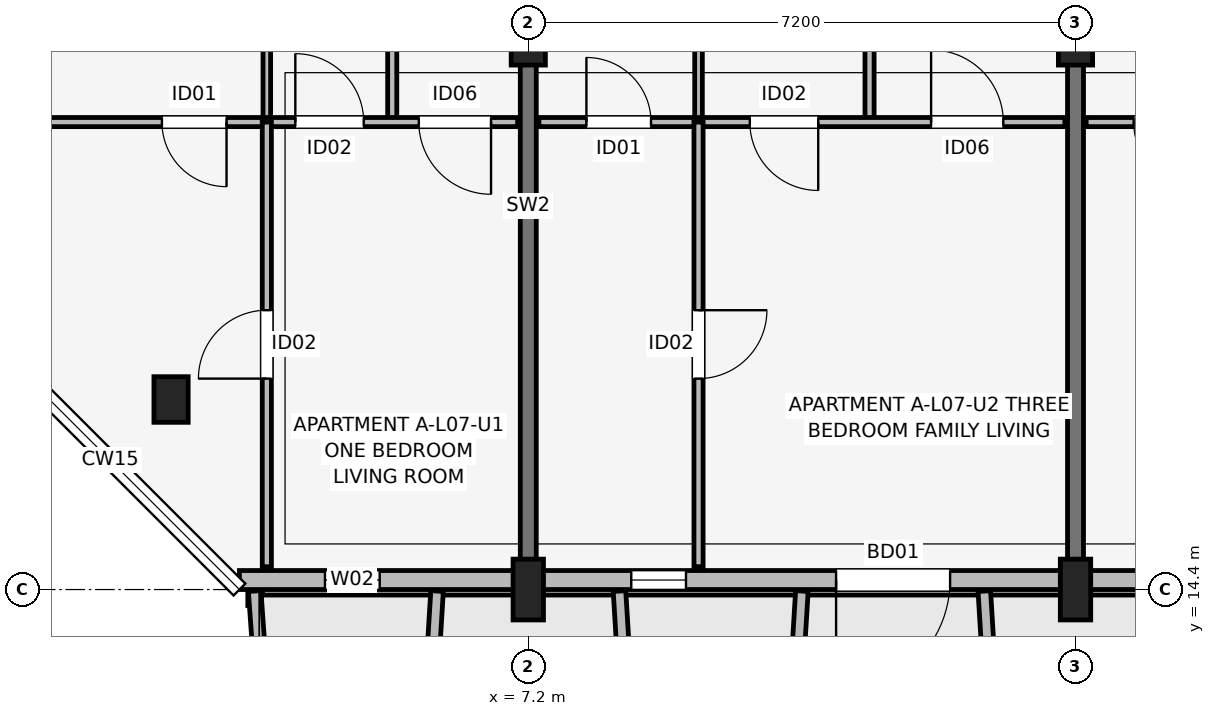
"""IFC4 building model, lengths in metres.
Left out: names, types, materials, properties, quantities, classifications, styles, units other than length and angle.
Written with IfcOpenShell. Run it as: python <this file> out.ifc"""

import sys

from ifc_helpers import new_model, si_unit, direction, frame, frame_2d, origin, origin_2d, place, context, subcontext, project, spatial, rectangle, extrude, element, fill, save


model = new_model("IFC4")
c1 = context("Model", 3, precision=1e-05, world=origin(), true_north=direction((0.0, 1.0)))
c2 = subcontext(c1, "Body", "Model", "MODEL_VIEW")
j1 = project(units=[si_unit("LENGTHUNIT", "METRE"), si_unit("PLANEANGLEUNIT", "RADIAN")], contexts=[c1])
p1 = place(None, origin())
s1 = spatial("IfcSite", under=j1, at=p1, CompositionType="ELEMENT")
p2 = place(p1, origin())
s2 = spatial("IfcBuilding", under=s1, at=p2, CompositionType="ELEMENT")
p3 = place(p2, frame((0.0, 0.0, 24.45)))
s3 = spatial("IfcBuildingStorey", under=s2, at=p3, CompositionType="ELEMENT", Elevation=24.45)
p4 = place(p3, frame((2.5, 16.9, 0.0), z_axis=(0.0, 0.0, 1.0), x_axis=(1.0, 0.0, 0.0)))
e1 = element("IfcColumn", 1, at=p4, inside=s3, PredefinedType="COLUMN", context=c2, shape_type="SweptSolid", body=[
    extrude(rectangle(XDim=0.45, YDim=0.6, at=origin_2d()), origin(), (0.0, 0.0, 1.0), 3.15),
])
p5 = place(p3, frame((7.2, 14.4, 0.0), z_axis=(0.0, 0.0, 1.0), x_axis=(1.0, 0.0, 0.0)))
e2 = element("IfcColumn", 2, at=p5, inside=s3, PredefinedType="COLUMN", context=c2, shape_type="SweptSolid", body=[
    extrude(rectangle(XDim=0.4, YDim=0.8, at=origin_2d()), origin(), (0.0, 0.0, 1.0), 3.15),
])
p6 = place(p3, frame((7.2, 21.6, 0.0), z_axis=(0.0, 0.0, 1.0), x_axis=(1.0, 0.0, 0.0)))
e3 = element("IfcColumn", 3, at=p6, inside=s3, PredefinedType="COLUMN", context=c2, shape_type="SweptSolid", body=[
    extrude(rectangle(XDim=0.45, YDim=0.6, at=origin_2d()), origin(), (0.0, 0.0, 1.0), 3.15),
])
p7 = place(p3, frame((14.4, 14.4, 0.0), z_axis=(0.0, 0.0, 1.0), x_axis=(1.0, 0.0, 0.0)))
e4 = element("IfcColumn", 4, at=p7, inside=s3, PredefinedType="COLUMN", context=c2, shape_type="SweptSolid", body=[
    extrude(rectangle(XDim=0.4, YDim=0.8, at=origin_2d()), origin(), (0.0, 0.0, 1.0), 3.15),
])
p8 = place(p3, frame((14.4, 21.6, 0.0), z_axis=(0.0, 0.0, 1.0), x_axis=(1.0, 0.0, 0.0)))
e5 = element("IfcColumn", 5, at=p8, inside=s3, PredefinedType="COLUMN", context=c2, shape_type="SweptSolid", body=[
    extrude(rectangle(XDim=0.45, YDim=0.6, at=origin_2d()), origin(), (0.0, 0.0, 1.0), 3.15),
])
for number, where, z_axis, x_axis in (
    (6, (7.2, 14.75, 0.0), (0.0, 0.0, 1.0), (0.0, 1.0, 0.0)),
    (7, (14.4, 14.75, 0.0), (0.0, 0.0, 1.0), (0.0, 1.0, 0.0)),
):
    element("IfcWall", number, at=place(p3, frame(where, z_axis=z_axis, x_axis=x_axis)), inside=s3, PredefinedType="SHEAR", context=c2, shape_type="SweptSolid", body=[
        extrude(rectangle(XDim=9.4, YDim=0.21, at=frame_2d((4.7, 0.0))), origin(), (0.0, 0.0, 1.0), 3.15),
    ])
p9 = place(p3, frame((3.4, 14.525, 0.0), z_axis=(0.0, 0.0, 1.0), x_axis=(1.0, 0.0, 0.0)))
e8 = element("IfcWall", 8, at=p9, inside=s3, PredefinedType="SOLIDWALL", context=c2, shape_type="SweptSolid", body=[
    extrude(rectangle(XDim=29.2, YDim=0.25, at=frame_2d((14.6, 0.0))), origin(), (0.0, 0.0, 1.0), 2.43),
])
p10 = place(p9, frame((9.35, 0.0, 0.0), z_axis=(0.0, 0.0, 1.0), x_axis=(-1.0, 0.0, 0.0)))
e9 = element("IfcOpeningElement", 9, at=p10, cuts=e8, PredefinedType="OPENING", context=c2, shape_type="SweptSolid", body=[
    extrude(rectangle(XDim=1.5, YDim=2.15, at=frame_2d((0.75, 1.075))), frame((0.0, 0.135, 0.0), z_axis=(0.0, -1.0, 0.0), x_axis=(1.0, 0.0, 0.0)), (0.0, 0.0, 1.0), 0.27),
])
p11 = place(p9, frame((23.9, 0.0, 0.0), z_axis=(0.0, 0.0, 1.0), x_axis=(-1.0, 0.0, 0.0)))
e10 = element("IfcOpeningElement", 10, at=p11, cuts=e8, PredefinedType="OPENING", context=c2, shape_type="SweptSolid", body=[
    extrude(rectangle(XDim=1.8, YDim=2.15, at=frame_2d((0.9, 1.075))), frame((0.0, 0.135, 0.0), z_axis=(0.0, -1.0, 0.0), x_axis=(1.0, 0.0, 0.0)), (0.0, 0.0, 1.0), 0.27),
])
p12 = place(p9, frame((1.125, 0.0, 0.75)))
e11 = element("IfcOpeningElement", 11, at=p12, cuts=e8, PredefinedType="OPENING", context=c2, shape_type="SweptSolid", body=[
    extrude(rectangle(XDim=0.72, YDim=1.35, at=frame_2d((0.36, 0.675))), frame((0.0, 0.135, 0.0), z_axis=(0.0, -1.0, 0.0), x_axis=(1.0, 0.0, 0.0)), (0.0, 0.0, 1.0), 0.27),
])
p13 = place(p9, frame((5.155, 0.0, 0.75)))
e12 = element("IfcOpeningElement", 12, at=p13, cuts=e8, PredefinedType="OPENING", context=c2, shape_type="SweptSolid", body=[
    extrude(rectangle(XDim=0.72, YDim=1.35, at=frame_2d((0.36, 0.675))), frame((0.0, 0.135, 0.0), z_axis=(0.0, -1.0, 0.0), x_axis=(1.0, 0.0, 0.0)), (0.0, 0.0, 1.0), 0.27),
])
p14 = place(p9, frame((12.325, 0.0, 0.67)))
e13 = element("IfcOpeningElement", 13, at=p14, cuts=e8, PredefinedType="OPENING", context=c2, shape_type="SweptSolid", body=[
    extrude(rectangle(XDim=2.15, YDim=1.65, at=frame_2d((1.075, 0.825))), frame((0.0, 0.135, 0.0), z_axis=(0.0, -1.0, 0.0), x_axis=(1.0, 0.0, 0.0)), (0.0, 0.0, 1.0), 0.27),
])
p15 = place(p9, frame((19.555, 0.0, 0.75)))
e14 = element("IfcOpeningElement", 14, at=p15, cuts=e8, PredefinedType="OPENING", context=c2, shape_type="SweptSolid", body=[
    extrude(rectangle(XDim=0.72, YDim=1.35, at=frame_2d((0.36, 0.675))), frame((0.0, 0.135, 0.0), z_axis=(0.0, -1.0, 0.0), x_axis=(1.0, 0.0, 0.0)), (0.0, 0.0, 1.0), 0.27),
])
p16 = place(p3, frame((3.6, 14.38, 0.0), z_axis=(0.0, 0.0, 1.0), x_axis=(0.071194071069, -0.997462482625, 0.0)))
e15 = element("IfcWall", 15, at=p16, inside=s3, PredefinedType="ELEMENTEDWALL", context=c2, shape_type="SweptSolid", body=[
    extrude(rectangle(XDim=1.965, YDim=0.165, at=frame_2d((0.982, 0.0))), origin(), (0.0, 0.0, 1.0), 2.8),
])
p17 = place(p3, frame((6.0, 14.38, 0.0), z_axis=(0.0, 0.0, 1.0), x_axis=(-0.061170732449, -0.998127317276, 0.0)))
e16 = element("IfcWall", 16, at=p17, inside=s3, PredefinedType="ELEMENTEDWALL", context=c2, shape_type="SweptSolid", body=[
    extrude(rectangle(XDim=1.964, YDim=0.165, at=frame_2d((0.982, 0.0))), origin(), (0.0, 0.0, 1.0), 2.8),
])
for number, where, z_axis, x_axis in (
    (17, (8.4, 14.38, 0.0), (0.0, 0.0, 1.0), (0.061, -0.998, 0.0)),
    (18, (10.8, 14.38, 0.0), (0.0, 0.0, 1.0), (-0.061, -0.998, 0.0)),
    (19, (13.2, 14.38, 0.0), (0.0, 0.0, 1.0), (0.061, -0.998, 0.0)),
):
    element("IfcWall", number, at=place(p3, frame(where, z_axis=z_axis, x_axis=x_axis)), inside=s3, PredefinedType="ELEMENTEDWALL", context=c2, shape_type="SweptSolid", body=[
        extrude(rectangle(XDim=1.964, YDim=0.165, at=frame_2d((0.982, 0.0))), origin(), (0.0, 0.0, 1.0), 2.53),
    ])
p18 = place(p3, frame((3.76, 20.55, 0.0), z_axis=(0.0, 0.0, 1.0), x_axis=(0.0, 1.0, 0.0)))
e20 = element("IfcWall", 20, at=p18, inside=s3, PredefinedType="PARTITIONING", context=c2, shape_type="SweptSolid", body=[
    extrude(rectangle(XDim=3.75, YDim=0.1, at=frame_2d((1.875, 0.0))), origin(), (0.0, 0.0, 1.0), 2.38),
])
p19 = place(p3, frame((5.41, 20.55, 0.0), z_axis=(0.0, 0.0, 1.0), x_axis=(0.0, 1.0, 0.0)))
e21 = element("IfcWall", 21, at=p19, inside=s3, PredefinedType="PARTITIONING", context=c2, shape_type="SweptSolid", body=[
    extrude(rectangle(XDim=3.75, YDim=0.12, at=frame_2d((1.875, 0.0))), origin(), (0.0, 0.0, 1.0), 2.38),
])
p20 = place(p3, frame((0.14, 20.55, 0.0), z_axis=(0.0, 0.0, 1.0), x_axis=(1.0, 0.0, 0.0)))
e22 = element("IfcWall", 22, at=p20, inside=s3, PredefinedType="PARTITIONING", context=c2, shape_type="SweptSolid", body=[
    extrude(rectangle(XDim=6.92, YDim=0.12, at=frame_2d((3.46, 0.0))), origin(), (0.0, 0.0, 1.0), 2.38),
])
p21 = place(p20, frame((3.09, 0.0, 0.0), z_axis=(0.0, 0.0, 1.0), x_axis=(-1.0, 0.0, 0.0)))
e23 = element("IfcOpeningElement", 23, at=p21, cuts=e22, PredefinedType="OPENING", context=c2, shape_type="SweptSolid", body=[
    extrude(rectangle(XDim=0.85, YDim=2.08, at=frame_2d((0.425, 1.04))), frame((0.0, 0.07, 0.0), z_axis=(0.0, -1.0, 0.0), x_axis=(1.0, 0.0, 0.0)), (0.0, 0.0, 1.0), 0.14),
])
p22 = place(p20, frame((3.995, 0.0, 0.0)))
e24 = element("IfcOpeningElement", 24, at=p22, cuts=e22, PredefinedType="OPENING", context=c2, shape_type="SweptSolid", body=[
    extrude(rectangle(XDim=0.9, YDim=2.08, at=frame_2d((0.45, 1.04))), frame((0.0, 0.07, 0.0), z_axis=(0.0, -1.0, 0.0), x_axis=(1.0, 0.0, 0.0)), (0.0, 0.0, 1.0), 0.14),
])
p23 = place(p20, frame((6.57, 0.0, 0.0), z_axis=(0.0, 0.0, 1.0), x_axis=(-1.0, 0.0, 0.0)))
e25 = element("IfcOpeningElement", 25, at=p23, cuts=e22, PredefinedType="OPENING", context=c2, shape_type="SweptSolid", body=[
    extrude(rectangle(XDim=0.95, YDim=2.08, at=frame_2d((0.475, 1.04))), frame((0.0, 0.07, 0.0), z_axis=(0.0, -1.0, 0.0), x_axis=(1.0, 0.0, 0.0)), (0.0, 0.0, 1.0), 0.14),
])
p24 = place(p3, frame((3.76, 14.7, 0.0), z_axis=(0.0, 0.0, 1.0), x_axis=(0.0, 1.0, 0.0)))
e26 = element("IfcWall", 26, at=p24, inside=s3, PredefinedType="PARTITIONING", context=c2, shape_type="SweptSolid", body=[
    extrude(rectangle(XDim=5.85, YDim=0.12, at=frame_2d((2.925, 0.0))), origin(), (0.0, 0.0, 1.0), 2.38),
])
p25 = place(p24, frame((2.475, 0.0, 0.0)))
e27 = element("IfcOpeningElement", 27, at=p25, cuts=e26, PredefinedType="OPENING", context=c2, shape_type="SweptSolid", body=[
    extrude(rectangle(XDim=0.9, YDim=2.08, at=frame_2d((0.45, 1.04))), frame((0.0, 0.07, 0.0), z_axis=(0.0, -1.0, 0.0), x_axis=(1.0, 0.0, 0.0)), (0.0, 0.0, 1.0), 0.14),
])
p26 = place(p3, frame((9.44, 20.55, 0.0), z_axis=(0.0, 0.0, 1.0), x_axis=(0.0, 1.0, 0.0)))
e28 = element("IfcWall", 28, at=p26, inside=s3, PredefinedType="PARTITIONING", context=c2, shape_type="SweptSolid", body=[
    extrude(rectangle(XDim=3.75, YDim=0.1, at=frame_2d((1.875, 0.0))), origin(), (0.0, 0.0, 1.0), 2.38),
])
p27 = place(p3, frame((11.69, 20.55, 0.0), z_axis=(0.0, 0.0, 1.0), x_axis=(0.0, 1.0, 0.0)))
e29 = element("IfcWall", 29, at=p27, inside=s3, PredefinedType="PARTITIONING", context=c2, shape_type="SweptSolid", body=[
    extrude(rectangle(XDim=3.75, YDim=0.12, at=frame_2d((1.875, 0.0))), origin(), (0.0, 0.0, 1.0), 2.38),
])
p28 = place(p3, frame((7.34, 20.55, 0.0), z_axis=(0.0, 0.0, 1.0), x_axis=(1.0, 0.0, 0.0)))
e30 = element("IfcWall", 30, at=p28, inside=s3, PredefinedType="PARTITIONING", context=c2, shape_type="SweptSolid", body=[
    extrude(rectangle(XDim=6.92, YDim=0.12, at=frame_2d((3.46, 0.0))), origin(), (0.0, 0.0, 1.0), 2.38),
])
p29 = place(p28, frame((0.625, 0.0, 0.0)))
e31 = element("IfcOpeningElement", 31, at=p29, cuts=e30, PredefinedType="OPENING", context=c2, shape_type="SweptSolid", body=[
    extrude(rectangle(XDim=0.85, YDim=2.08, at=frame_2d((0.425, 1.04))), frame((0.0, 0.07, 0.0), z_axis=(0.0, -1.0, 0.0), x_axis=(1.0, 0.0, 0.0)), (0.0, 0.0, 1.0), 0.14),
])
p30 = place(p28, frame((3.675, 0.0, 0.0), z_axis=(0.0, 0.0, 1.0), x_axis=(-1.0, 0.0, 0.0)))
e32 = element("IfcOpeningElement", 32, at=p30, cuts=e30, PredefinedType="OPENING", context=c2, shape_type="SweptSolid", body=[
    extrude(rectangle(XDim=0.9, YDim=2.08, at=frame_2d((0.45, 1.04))), frame((0.0, 0.07, 0.0), z_axis=(0.0, -1.0, 0.0), x_axis=(1.0, 0.0, 0.0)), (0.0, 0.0, 1.0), 0.14),
])
p31 = place(p28, frame((5.16, 0.0, 0.0)))
e33 = element("IfcOpeningElement", 33, at=p31, cuts=e30, PredefinedType="OPENING", context=c2, shape_type="SweptSolid", body=[
    extrude(rectangle(XDim=0.95, YDim=2.08, at=frame_2d((0.475, 1.04))), frame((0.0, 0.07, 0.0), z_axis=(0.0, -1.0, 0.0), x_axis=(1.0, 0.0, 0.0)), (0.0, 0.0, 1.0), 0.14),
])
p32 = place(p3, frame((9.44, 14.7, 0.0), z_axis=(0.0, 0.0, 1.0), x_axis=(0.0, 1.0, 0.0)))
e34 = element("IfcWall", 34, at=p32, inside=s3, PredefinedType="PARTITIONING", context=c2, shape_type="SweptSolid", body=[
    extrude(rectangle(XDim=5.85, YDim=0.12, at=frame_2d((2.925, 0.0))), origin(), (0.0, 0.0, 1.0), 2.38),
])
p33 = place(p32, frame((3.375, 0.0, 0.0), z_axis=(0.0, 0.0, 1.0), x_axis=(-1.0, 0.0, 0.0)))
e35 = element("IfcOpeningElement", 35, at=p33, cuts=e34, PredefinedType="OPENING", context=c2, shape_type="SweptSolid", body=[
    extrude(rectangle(XDim=0.9, YDim=2.08, at=frame_2d((0.45, 1.04))), frame((0.0, 0.07, 0.0), z_axis=(0.0, -1.0, 0.0), x_axis=(1.0, 0.0, 0.0)), (0.0, 0.0, 1.0), 0.14),
])
p34 = place(p3, frame((14.54, 20.55, 0.0), z_axis=(0.0, 0.0, 1.0), x_axis=(1.0, 0.0, 0.0)))
e36 = element("IfcWall", 36, at=p34, inside=s3, PredefinedType="PARTITIONING", context=c2, shape_type="SweptSolid", body=[
    extrude(rectangle(XDim=6.92, YDim=0.12, at=frame_2d((3.46, 0.0))), origin(), (0.0, 0.0, 1.0), 2.38),
])
p35 = place(p34, frame((1.475, 0.0, 0.0), z_axis=(0.0, 0.0, 1.0), x_axis=(-1.0, 0.0, 0.0)))
e37 = element("IfcOpeningElement", 37, at=p35, cuts=e36, PredefinedType="OPENING", context=c2, shape_type="SweptSolid", body=[
    extrude(rectangle(XDim=0.85, YDim=2.08, at=frame_2d((0.425, 1.04))), frame((0.0, 0.07, 0.0), z_axis=(0.0, -1.0, 0.0), x_axis=(1.0, 0.0, 0.0)), (0.0, 0.0, 1.0), 0.14),
])
p36 = place(p34, frame((2.625, 0.0, 0.0)))
e38 = element("IfcOpeningElement", 38, at=p36, cuts=e36, PredefinedType="OPENING", context=c2, shape_type="SweptSolid", body=[
    extrude(rectangle(XDim=0.9, YDim=2.08, at=frame_2d((0.45, 1.04))), frame((0.0, 0.07, 0.0), z_axis=(0.0, -1.0, 0.0), x_axis=(1.0, 0.0, 0.0)), (0.0, 0.0, 1.0), 0.14),
])
p37 = place(p34, frame((5.96, 0.0, 0.0), z_axis=(0.0, 0.0, 1.0), x_axis=(-1.0, 0.0, 0.0)))
e39 = element("IfcOpeningElement", 39, at=p37, cuts=e36, PredefinedType="OPENING", context=c2, shape_type="SweptSolid", body=[
    extrude(rectangle(XDim=0.95, YDim=2.08, at=frame_2d((0.475, 1.04))), frame((0.0, 0.07, 0.0), z_axis=(0.0, -1.0, 0.0), x_axis=(1.0, 0.0, 0.0)), (0.0, 0.0, 1.0), 0.14),
])
p38 = place(p10, origin())
e40 = element("IfcDoor", 40, at=p38, inside=s3, OperationType="SINGLE_SWING_LEFT", PredefinedType="DOOR", context=c2, shape_type="SweptSolid", body=[
    extrude(rectangle(XDim=1.5, YDim=2.15, at=frame_2d((0.75, 1.075))), frame((0.0, 0.025, 0.0), z_axis=(0.0, -1.0, 0.0), x_axis=(1.0, 0.0, 0.0)), (0.0, 0.0, 1.0), 0.05),
])
fill(e9, e40)
p39 = place(p12, origin())
e41 = element("IfcWindow", 41, at=p39, inside=s3, PartitioningType="SINGLE_PANEL", PredefinedType="WINDOW", context=c2, shape_type="SweptSolid", body=[
    extrude(rectangle(XDim=0.72, YDim=1.35, at=frame_2d((0.36, 0.675))), frame((0.0, 0.03, 0.0), z_axis=(0.0, -1.0, 0.0), x_axis=(1.0, 0.0, 0.0)), (0.0, 0.0, 1.0), 0.06),
])
fill(e11, e41)
p40 = place(p13, origin())
e42 = element("IfcWindow", 42, at=p40, inside=s3, PartitioningType="SINGLE_PANEL", PredefinedType="WINDOW", context=c2, shape_type="SweptSolid", body=[
    extrude(rectangle(XDim=0.72, YDim=1.35, at=frame_2d((0.36, 0.675))), frame((0.0, 0.03, 0.0), z_axis=(0.0, -1.0, 0.0), x_axis=(1.0, 0.0, 0.0)), (0.0, 0.0, 1.0), 0.06),
])
fill(e12, e42)
p41 = place(p21, origin())
e43 = element("IfcDoor", 43, at=p41, inside=s3, OperationType="SINGLE_SWING_RIGHT", PredefinedType="DOOR", context=c2, shape_type="SweptSolid", body=[
    extrude(rectangle(XDim=0.85, YDim=2.08, at=frame_2d((0.425, 1.04))), frame((0.0, 0.025, 0.0), z_axis=(0.0, -1.0, 0.0), x_axis=(1.0, 0.0, 0.0)), (0.0, 0.0, 1.0), 0.05),
])
fill(e23, e43)
p42 = place(p22, origin())
e44 = element("IfcDoor", 44, at=p42, inside=s3, OperationType="SINGLE_SWING_LEFT", PredefinedType="DOOR", context=c2, shape_type="SweptSolid", body=[
    extrude(rectangle(XDim=0.9, YDim=2.08, at=frame_2d((0.45, 1.04))), frame((0.0, 0.025, 0.0), z_axis=(0.0, -1.0, 0.0), x_axis=(1.0, 0.0, 0.0)), (0.0, 0.0, 1.0), 0.05),
])
fill(e24, e44)
p43 = place(p23, origin())
e45 = element("IfcDoor", 45, at=p43, inside=s3, OperationType="SINGLE_SWING_RIGHT", PredefinedType="DOOR", context=c2, shape_type="SweptSolid", body=[
    extrude(rectangle(XDim=0.95, YDim=2.08, at=frame_2d((0.475, 1.04))), frame((0.0, 0.025, 0.0), z_axis=(0.0, -1.0, 0.0), x_axis=(1.0, 0.0, 0.0)), (0.0, 0.0, 1.0), 0.05),
])
fill(e25, e45)
p44 = place(p25, origin())
e46 = element("IfcDoor", 46, at=p44, inside=s3, OperationType="SINGLE_SWING_LEFT", PredefinedType="DOOR", context=c2, shape_type="SweptSolid", body=[
    extrude(rectangle(XDim=0.9, YDim=2.08, at=frame_2d((0.45, 1.04))), frame((0.0, 0.025, 0.0), z_axis=(0.0, -1.0, 0.0), x_axis=(1.0, 0.0, 0.0)), (0.0, 0.0, 1.0), 0.05),
])
fill(e27, e46)
p45 = place(p29, origin())
e47 = element("IfcDoor", 47, at=p45, inside=s3, OperationType="SINGLE_SWING_LEFT", PredefinedType="DOOR", context=c2, shape_type="SweptSolid", body=[
    extrude(rectangle(XDim=0.85, YDim=2.08, at=frame_2d((0.425, 1.04))), frame((0.0, 0.025, 0.0), z_axis=(0.0, -1.0, 0.0), x_axis=(1.0, 0.0, 0.0)), (0.0, 0.0, 1.0), 0.05),
])
fill(e31, e47)
p46 = place(p30, origin())
e48 = element("IfcDoor", 48, at=p46, inside=s3, OperationType="SINGLE_SWING_RIGHT", PredefinedType="DOOR", context=c2, shape_type="SweptSolid", body=[
    extrude(rectangle(XDim=0.9, YDim=2.08, at=frame_2d((0.45, 1.04))), frame((0.0, 0.025, 0.0), z_axis=(0.0, -1.0, 0.0), x_axis=(1.0, 0.0, 0.0)), (0.0, 0.0, 1.0), 0.05),
])
fill(e32, e48)
p47 = place(p31, origin())
e49 = element("IfcDoor", 49, at=p47, inside=s3, OperationType="SINGLE_SWING_LEFT", PredefinedType="DOOR", context=c2, shape_type="SweptSolid", body=[
    extrude(rectangle(XDim=0.95, YDim=2.08, at=frame_2d((0.475, 1.04))), frame((0.0, 0.025, 0.0), z_axis=(0.0, -1.0, 0.0), x_axis=(1.0, 0.0, 0.0)), (0.0, 0.0, 1.0), 0.05),
])
fill(e33, e49)
p48 = place(p33, origin())
e50 = element("IfcDoor", 50, at=p48, inside=s3, OperationType="SINGLE_SWING_RIGHT", PredefinedType="DOOR", context=c2, shape_type="SweptSolid", body=[
    extrude(rectangle(XDim=0.9, YDim=2.08, at=frame_2d((0.45, 1.04))), frame((0.0, 0.025, 0.0), z_axis=(0.0, -1.0, 0.0), x_axis=(1.0, 0.0, 0.0)), (0.0, 0.0, 1.0), 0.05),
])
fill(e35, e50)
p49 = place(p35, origin())
e51 = element("IfcDoor", 51, at=p49, inside=s3, OperationType="SINGLE_SWING_RIGHT", PredefinedType="DOOR", context=c2, shape_type="SweptSolid", body=[
    extrude(rectangle(XDim=0.85, YDim=2.08, at=frame_2d((0.425, 1.04))), frame((0.0, 0.025, 0.0), z_axis=(0.0, -1.0, 0.0), x_axis=(1.0, 0.0, 0.0)), (0.0, 0.0, 1.0), 0.05),
])
fill(e37, e51)
save(model, sys.argv[1])
